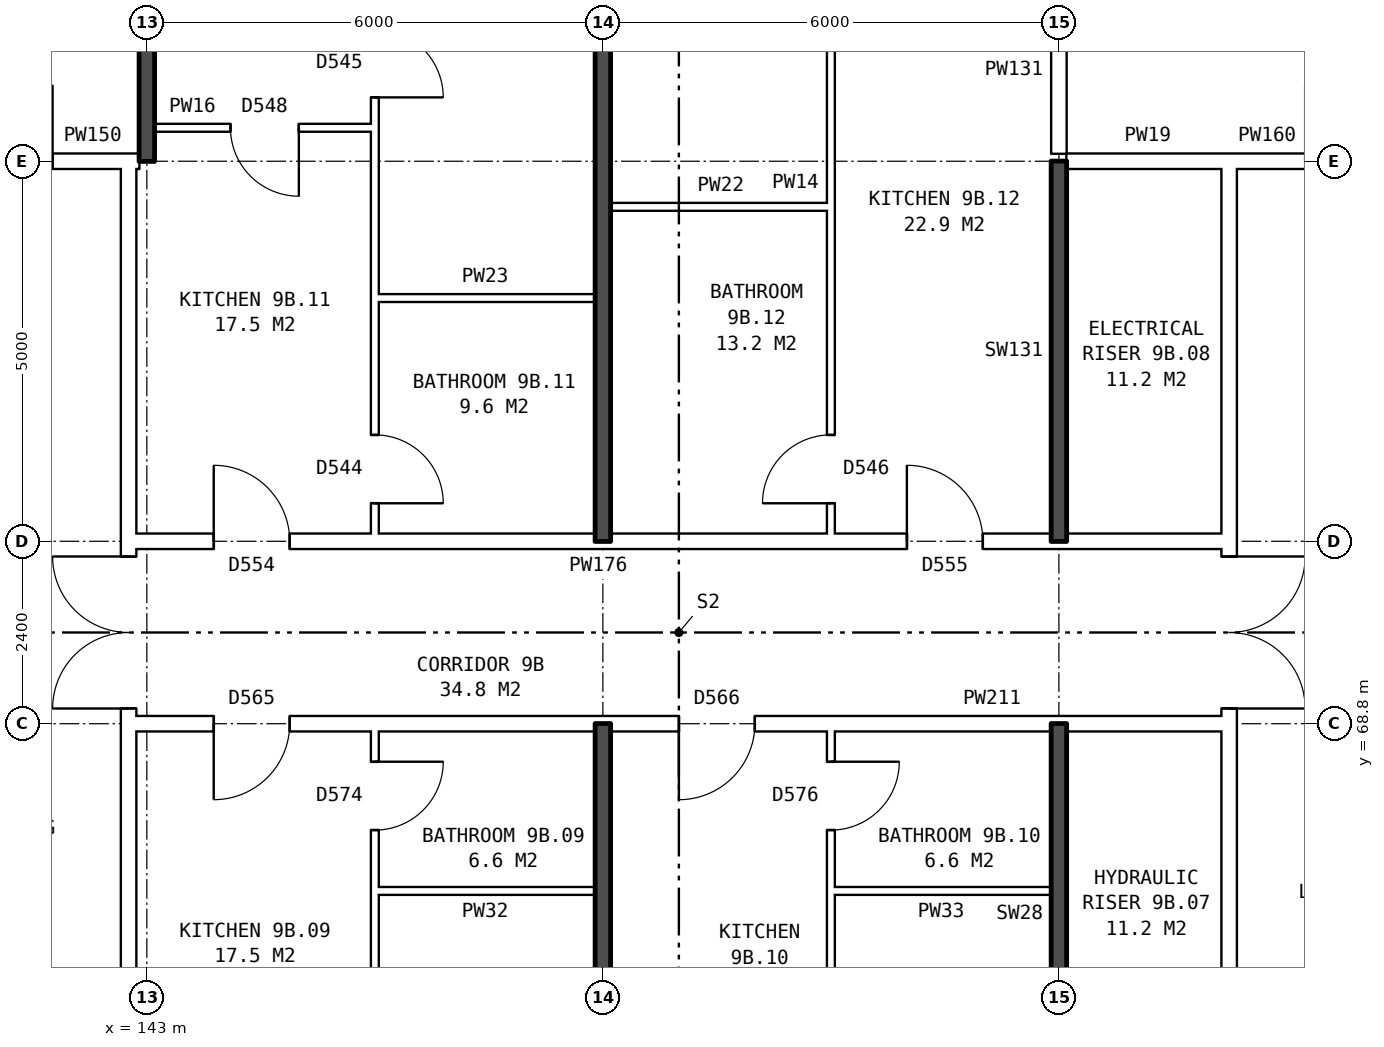
"""IFC4 building model, lengths in metres.
Left out: names, types, materials, properties, quantities, classifications, styles, units other than length and angle.
Written with IfcOpenShell. Run it as: python <this file> out.ifc"""

import sys

from ifc_helpers import new_model, si_unit, direction, frame, frame_2d, origin, place, context, subcontext, project, spatial, rectangle, extrude, element, fill, save


model = new_model("IFC4")
c1 = context("Model", 3, precision=1e-05, world=origin(), true_north=direction((0.0, 1.0)))
c2 = subcontext(c1, "Body", "Model", "MODEL_VIEW")
j1 = project(units=[si_unit("LENGTHUNIT", "METRE"), si_unit("PLANEANGLEUNIT", "RADIAN")], contexts=[c1])
p1 = place(None, origin())
s1 = spatial("IfcSite", under=j1, at=p1, CompositionType="ELEMENT")
p2 = place(p1, origin())
s2 = spatial("IfcBuilding", under=s1, at=p2, CompositionType="ELEMENT")
p3 = place(p2, frame((0.0, 0.0, 35.0)))
s3 = spatial("IfcBuildingStorey", under=s2, at=p3, CompositionType="ELEMENT", Elevation=35.0)
p4 = place(p3, frame((142.76, 63.9, 0.0), z_axis=(0.0, 0.0, 1.0), x_axis=(0.0, 1.0, 0.0)))
e1 = element("IfcWall", 1, at=p4, inside=s3, PredefinedType="PARTITIONING", context=c2, shape_type="SweptSolid", body=[
    extrude(rectangle(XDim=12.2, YDim=0.2, at=frame_2d((6.1, 0.0))), origin(), (0.0, 0.0, 1.0), 2.85),
])
p5 = place(p4, frame((5.1, 0.0, 0.0)))
e2 = element("IfcOpeningElement", 2, at=p5, cuts=e1, PredefinedType="OPENING", context=c2, shape_type="SweptSolid", body=[
    extrude(rectangle(XDim=2.0, YDim=2.1, at=frame_2d((1.0, 1.05))), frame((0.0, 0.11, 0.0), z_axis=(0.0, -1.0, 0.0), x_axis=(1.0, 0.0, 0.0)), (0.0, 0.0, 1.0), 0.22),
])
p6 = place(p3, frame((157.24, 63.9, 0.0), z_axis=(0.0, 0.0, 1.0), x_axis=(0.0, 1.0, 0.0)))
e3 = element("IfcWall", 3, at=p6, inside=s3, PredefinedType="PARTITIONING", context=c2, shape_type="SweptSolid", body=[
    extrude(rectangle(XDim=12.2, YDim=0.2, at=frame_2d((6.1, 0.0))), origin(), (0.0, 0.0, 1.0), 2.85),
])
p7 = place(p6, frame((5.1, 0.0, 0.0)))
e4 = element("IfcOpeningElement", 4, at=p7, cuts=e3, PredefinedType="OPENING", context=c2, shape_type="SweptSolid", body=[
    extrude(rectangle(XDim=2.0, YDim=2.1, at=frame_2d((1.0, 1.05))), frame((0.0, 0.11, 0.0), z_axis=(0.0, -1.0, 0.0), x_axis=(1.0, 0.0, 0.0)), (0.0, 0.0, 1.0), 0.22),
])
for number, where, z_axis, x_axis in (
    (5, (146.0, 66.6, 0.0), (0.0, 0.0, 1.0), (1.0, 0.0, 0.0)),
    (6, (152.0, 66.6, 0.0), (0.0, 0.0, 1.0), (1.0, 0.0, 0.0)),
):
    element("IfcWall", number, at=place(p3, frame(where, z_axis=z_axis, x_axis=x_axis)), inside=s3, PredefinedType="PARTITIONING", context=c2, shape_type="SweptSolid", body=[
        extrude(rectangle(XDim=2.9, YDim=0.1, at=frame_2d((1.45, 0.0))), origin(), (0.0, 0.0, 1.0), 2.85),
    ])
p8 = place(p3, frame((142.76, 68.8, 0.0), z_axis=(0.0, 0.0, 1.0), x_axis=(1.0, 0.0, 0.0)))
e7 = element("IfcWall", 7, at=p8, inside=s3, PredefinedType="PARTITIONING", context=c2, shape_type="SweptSolid", body=[
    extrude(rectangle(XDim=14.48, YDim=0.2, at=frame_2d((7.24, 0.0))), origin(), (0.0, 0.0, 1.0), 2.85),
])
p9 = place(p8, frame((1.12, 0.0, 0.0)))
e8 = element("IfcOpeningElement", 8, at=p9, cuts=e7, PredefinedType="OPENING", context=c2, shape_type="SweptSolid", body=[
    extrude(rectangle(XDim=1.0, YDim=2.1, at=frame_2d((0.5, 1.05))), frame((0.0, 0.11, 0.0), z_axis=(0.0, -1.0, 0.0), x_axis=(1.0, 0.0, 0.0)), (0.0, 0.0, 1.0), 0.22),
])
p10 = place(p8, frame((7.24, 0.0, 0.0)))
e9 = element("IfcOpeningElement", 9, at=p10, cuts=e7, PredefinedType="OPENING", context=c2, shape_type="SweptSolid", body=[
    extrude(rectangle(XDim=1.0, YDim=2.1, at=frame_2d((0.5, 1.05))), frame((0.0, 0.11, 0.0), z_axis=(0.0, -1.0, 0.0), x_axis=(1.0, 0.0, 0.0)), (0.0, 0.0, 1.0), 0.22),
])
p11 = place(p3, frame((142.76, 71.2, 0.0), z_axis=(0.0, 0.0, 1.0), x_axis=(1.0, 0.0, 0.0)))
e10 = element("IfcWall", 10, at=p11, inside=s3, PredefinedType="PARTITIONING", context=c2, shape_type="SweptSolid", body=[
    extrude(rectangle(XDim=14.48, YDim=0.2, at=frame_2d((7.24, 0.0))), origin(), (0.0, 0.0, 1.0), 2.85),
])
p12 = place(p11, frame((1.12, 0.0, 0.0)))
e11 = element("IfcOpeningElement", 11, at=p12, cuts=e10, PredefinedType="OPENING", context=c2, shape_type="SweptSolid", body=[
    extrude(rectangle(XDim=1.0, YDim=2.1, at=frame_2d((0.5, 1.05))), frame((0.0, 0.11, 0.0), z_axis=(0.0, -1.0, 0.0), x_axis=(1.0, 0.0, 0.0)), (0.0, 0.0, 1.0), 0.22),
])
p13 = place(p11, frame((10.24, 0.0, 0.0)))
e12 = element("IfcOpeningElement", 12, at=p13, cuts=e10, PredefinedType="OPENING", context=c2, shape_type="SweptSolid", body=[
    extrude(rectangle(XDim=1.0, YDim=2.1, at=frame_2d((0.5, 1.05))), frame((0.0, 0.11, 0.0), z_axis=(0.0, -1.0, 0.0), x_axis=(1.0, 0.0, 0.0)), (0.0, 0.0, 1.0), 0.22),
])
for number, where, z_axis, x_axis in (
    (13, (146.0, 74.4, 0.0), (0.0, 0.0, 1.0), (1.0, 0.0, 0.0)),
    (14, (149.1, 75.6, 0.0), (0.0, 0.0, 1.0), (1.0, 0.0, 0.0)),
):
    element("IfcWall", number, at=place(p3, frame(where, z_axis=z_axis, x_axis=x_axis)), inside=s3, PredefinedType="PARTITIONING", context=c2, shape_type="SweptSolid", body=[
        extrude(rectangle(XDim=2.9, YDim=0.1, at=frame_2d((1.45, 0.0))), origin(), (0.0, 0.0, 1.0), 2.85),
    ])
p14 = place(p3, frame((139.76, 76.2, 0.0), z_axis=(0.0, 0.0, 1.0), x_axis=(1.0, 0.0, 0.0)))
e15 = element("IfcWall", 15, at=p14, inside=s3, PredefinedType="PARTITIONING", context=c2, shape_type="SweptSolid", body=[
    extrude(rectangle(XDim=3.0, YDim=0.2, at=frame_2d((1.5, 0.0))), origin(), (0.0, 0.0, 1.0), 2.85),
])
p15 = place(p14, frame((1.0, 0.0, 0.0)))
e16 = element("IfcOpeningElement", 16, at=p15, cuts=e15, PredefinedType="OPENING", context=c2, shape_type="SweptSolid", body=[
    extrude(rectangle(XDim=1.0, YDim=2.1, at=frame_2d((0.5, 1.05))), frame((0.0, 0.11, 0.0), z_axis=(0.0, -1.0, 0.0), x_axis=(1.0, 0.0, 0.0)), (0.0, 0.0, 1.0), 0.22),
])
p16 = place(p3, frame((142.76, 76.2, 0.0), z_axis=(0.0, 0.0, 1.0), x_axis=(1.0, 0.0, 0.0)))
e17 = element("IfcWall", 17, at=p16, inside=s3, PredefinedType="PARTITIONING", context=c2, shape_type="SweptSolid", body=[
    extrude(rectangle(XDim=0.14, YDim=0.2, at=frame_2d((0.07, 0.0))), origin(), (0.0, 0.0, 1.0), 2.85),
])
p17 = place(p3, frame((155.1, 76.2, 0.0), z_axis=(0.0, 0.0, 1.0), x_axis=(1.0, 0.0, 0.0)))
e18 = element("IfcWall", 18, at=p17, inside=s3, PredefinedType="PARTITIONING", context=c2, shape_type="SweptSolid", body=[
    extrude(rectangle(XDim=2.14, YDim=0.2, at=frame_2d((1.07, 0.0))), origin(), (0.0, 0.0, 1.0), 2.85),
])
p18 = place(p3, frame((157.24, 76.2, 0.0), z_axis=(0.0, 0.0, 1.0), x_axis=(1.0, 0.0, 0.0)))
e19 = element("IfcWall", 19, at=p18, inside=s3, PredefinedType="PARTITIONING", context=c2, shape_type="SweptSolid", body=[
    extrude(rectangle(XDim=3.0, YDim=0.2, at=frame_2d((1.5, 0.0))), origin(), (0.0, 0.0, 1.0), 2.85),
])
p19 = place(p18, frame((1.0, 0.0, 0.0)))
e20 = element("IfcOpeningElement", 20, at=p19, cuts=e19, PredefinedType="OPENING", context=c2, shape_type="SweptSolid", body=[
    extrude(rectangle(XDim=1.0, YDim=2.1, at=frame_2d((0.5, 1.05))), frame((0.0, 0.11, 0.0), z_axis=(0.0, -1.0, 0.0), x_axis=(1.0, 0.0, 0.0)), (0.0, 0.0, 1.0), 0.22),
])
p20 = place(p3, frame((143.1, 76.64, 0.0), z_axis=(0.0, 0.0, 1.0), x_axis=(1.0, 0.0, 0.0)))
e21 = element("IfcWall", 21, at=p20, inside=s3, PredefinedType="PARTITIONING", context=c2, shape_type="SweptSolid", body=[
    extrude(rectangle(XDim=2.9, YDim=0.1, at=frame_2d((1.45, 0.0))), origin(), (0.0, 0.0, 1.0), 2.85),
])
p21 = place(p20, frame((1.0, 0.0, 0.0)))
e22 = element("IfcOpeningElement", 22, at=p21, cuts=e21, PredefinedType="OPENING", context=c2, shape_type="SweptSolid", body=[
    extrude(rectangle(XDim=0.9, YDim=2.1, at=frame_2d((0.45, 1.05))), frame((0.0, 0.06, 0.0), z_axis=(0.0, -1.0, 0.0), x_axis=(1.0, 0.0, 0.0)), (0.0, 0.0, 1.0), 0.12),
])
p22 = place(p3, frame((143.0, 76.2, 0.0), z_axis=(0.0, 0.0, 1.0), x_axis=(0.0, 1.0, 0.0)))
e23 = element("IfcWall", 23, at=p22, inside=s3, PredefinedType="SOLIDWALL", context=c2, shape_type="SweptSolid", body=[
    extrude(rectangle(XDim=9.44, YDim=0.2, at=frame_2d((4.72, 0.0))), origin(), (0.0, 0.0, 1.0), 2.85),
])
p23 = place(p3, frame((146.0, 54.36, 0.0), z_axis=(0.0, 0.0, 1.0), x_axis=(0.0, 1.0, 0.0)))
e24 = element("IfcWall", 24, at=p23, inside=s3, PredefinedType="PARTITIONING", context=c2, shape_type="SweptSolid", body=[
    extrude(rectangle(XDim=14.34, YDim=0.1, at=frame_2d((7.17, 0.0))), origin(), (0.0, 0.0, 1.0), 2.85),
])
p24 = place(p23, frame((7.7, 0.0, 0.0)))
e25 = element("IfcOpeningElement", 25, at=p24, cuts=e24, PredefinedType="OPENING", context=c2, shape_type="SweptSolid", body=[
    extrude(rectangle(XDim=0.9, YDim=2.1, at=frame_2d((0.45, 1.05))), frame((0.0, 0.06, 0.0), z_axis=(0.0, -1.0, 0.0), x_axis=(1.0, 0.0, 0.0)), (0.0, 0.0, 1.0), 0.12),
])
p25 = place(p23, frame((13.04, 0.0, 0.0)))
e26 = element("IfcOpeningElement", 26, at=p25, cuts=e24, PredefinedType="OPENING", context=c2, shape_type="SweptSolid", body=[
    extrude(rectangle(XDim=0.9, YDim=2.1, at=frame_2d((0.45, 1.05))), frame((0.0, 0.06, 0.0), z_axis=(0.0, -1.0, 0.0), x_axis=(1.0, 0.0, 0.0)), (0.0, 0.0, 1.0), 0.12),
])
p26 = place(p3, frame((146.0, 71.3, 0.0), z_axis=(0.0, 0.0, 1.0), x_axis=(0.0, 1.0, 0.0)))
e27 = element("IfcWall", 27, at=p26, inside=s3, PredefinedType="PARTITIONING", context=c2, shape_type="SweptSolid", body=[
    extrude(rectangle(XDim=14.34, YDim=0.1, at=frame_2d((7.17, 0.0))), origin(), (0.0, 0.0, 1.0), 2.85),
])
p27 = place(p26, frame((5.74, 0.0, 0.0)))
e28 = element("IfcOpeningElement", 28, at=p27, cuts=e27, PredefinedType="OPENING", context=c2, shape_type="SweptSolid", body=[
    extrude(rectangle(XDim=0.9, YDim=2.1, at=frame_2d((0.45, 1.05))), frame((0.0, 0.06, 0.0), z_axis=(0.0, -1.0, 0.0), x_axis=(1.0, 0.0, 0.0)), (0.0, 0.0, 1.0), 0.12),
])
p28 = place(p26, frame((0.4, 0.0, 0.0)))
e29 = element("IfcOpeningElement", 29, at=p28, cuts=e27, PredefinedType="OPENING", context=c2, shape_type="SweptSolid", body=[
    extrude(rectangle(XDim=0.9, YDim=2.1, at=frame_2d((0.45, 1.05))), frame((0.0, 0.06, 0.0), z_axis=(0.0, -1.0, 0.0), x_axis=(1.0, 0.0, 0.0)), (0.0, 0.0, 1.0), 0.12),
])
for number, where, z_axis, x_axis in (
    (30, (149.0, 54.36, 0.0), (0.0, 0.0, 1.0), (0.0, 1.0, 0.0)),
    (31, (149.0, 71.2, 0.0), (0.0, 0.0, 1.0), (0.0, 1.0, 0.0)),
):
    element("IfcWall", number, at=place(p3, frame(where, z_axis=z_axis, x_axis=x_axis)), inside=s3, PredefinedType="SOLIDWALL", context=c2, shape_type="SweptSolid", body=[
        extrude(rectangle(XDim=14.44, YDim=0.2, at=frame_2d((7.22, 0.0))), origin(), (0.0, 0.0, 1.0), 2.85),
    ])
p29 = place(p3, frame((152.0, 54.36, 0.0), z_axis=(0.0, 0.0, 1.0), x_axis=(0.0, 1.0, 0.0)))
e32 = element("IfcWall", 32, at=p29, inside=s3, PredefinedType="PARTITIONING", context=c2, shape_type="SweptSolid", body=[
    extrude(rectangle(XDim=14.34, YDim=0.1, at=frame_2d((7.17, 0.0))), origin(), (0.0, 0.0, 1.0), 2.85),
])
p30 = place(p29, frame((6.7, 0.0, 0.0)))
e33 = element("IfcOpeningElement", 33, at=p30, cuts=e32, PredefinedType="OPENING", context=c2, shape_type="SweptSolid", body=[
    extrude(rectangle(XDim=0.9, YDim=2.1, at=frame_2d((0.45, 1.05))), frame((0.0, 0.06, 0.0), z_axis=(0.0, -1.0, 0.0), x_axis=(1.0, 0.0, 0.0)), (0.0, 0.0, 1.0), 0.12),
])
p31 = place(p29, frame((13.04, 0.0, 0.0)))
e34 = element("IfcOpeningElement", 34, at=p31, cuts=e32, PredefinedType="OPENING", context=c2, shape_type="SweptSolid", body=[
    extrude(rectangle(XDim=0.9, YDim=2.1, at=frame_2d((0.45, 1.05))), frame((0.0, 0.06, 0.0), z_axis=(0.0, -1.0, 0.0), x_axis=(1.0, 0.0, 0.0)), (0.0, 0.0, 1.0), 0.12),
])
p32 = place(p3, frame((152.0, 71.3, 0.0), z_axis=(0.0, 0.0, 1.0), x_axis=(0.0, 1.0, 0.0)))
e35 = element("IfcWall", 35, at=p32, inside=s3, PredefinedType="PARTITIONING", context=c2, shape_type="SweptSolid", body=[
    extrude(rectangle(XDim=14.34, YDim=0.1, at=frame_2d((7.17, 0.0))), origin(), (0.0, 0.0, 1.0), 2.85),
])
p33 = place(p32, frame((7.94, 0.0, 0.0)))
e36 = element("IfcOpeningElement", 36, at=p33, cuts=e35, PredefinedType="OPENING", context=c2, shape_type="SweptSolid", body=[
    extrude(rectangle(XDim=0.9, YDim=2.1, at=frame_2d((0.45, 1.05))), frame((0.0, 0.06, 0.0), z_axis=(0.0, -1.0, 0.0), x_axis=(1.0, 0.0, 0.0)), (0.0, 0.0, 1.0), 0.12),
])
p34 = place(p32, frame((0.4, 0.0, 0.0)))
e37 = element("IfcOpeningElement", 37, at=p34, cuts=e35, PredefinedType="OPENING", context=c2, shape_type="SweptSolid", body=[
    extrude(rectangle(XDim=0.9, YDim=2.1, at=frame_2d((0.45, 1.05))), frame((0.0, 0.06, 0.0), z_axis=(0.0, -1.0, 0.0), x_axis=(1.0, 0.0, 0.0)), (0.0, 0.0, 1.0), 0.12),
])
for number, where, z_axis, x_axis in (
    (38, (155.0, 63.8, 0.0), (0.0, 0.0, 1.0), (0.0, 1.0, 0.0)),
    (39, (155.0, 71.2, 0.0), (0.0, 0.0, 1.0), (0.0, 1.0, 0.0)),
):
    element("IfcWall", number, at=place(p3, frame(where, z_axis=z_axis, x_axis=x_axis)), inside=s3, PredefinedType="SOLIDWALL", context=c2, shape_type="SweptSolid", body=[
        extrude(rectangle(XDim=5.0, YDim=0.2, at=frame_2d((2.5, 0.0))), origin(), (0.0, 0.0, 1.0), 2.85),
    ])
p35 = place(p3, frame((155.0, 76.3, 0.0), z_axis=(0.0, 0.0, 1.0), x_axis=(0.0, 1.0, 0.0)))
e40 = element("IfcWall", 40, at=p35, inside=s3, PredefinedType="PARTITIONING", context=c2, shape_type="SweptSolid", body=[
    extrude(rectangle(XDim=2.2, YDim=0.2, at=frame_2d((1.1, 0.0))), origin(), (0.0, 0.0, 1.0), 2.85),
])
p36 = place(p5, origin())
e41 = element("IfcDoor", 41, at=p36, inside=s3, OperationType="DOUBLE_DOOR_SINGLE_SWING", PredefinedType="DOOR", context=c2, shape_type="SweptSolid", body=[
    extrude(rectangle(XDim=2.0, YDim=2.1, at=frame_2d((1.0, 1.05))), frame((0.0, 0.025, 0.0), z_axis=(0.0, -1.0, 0.0), x_axis=(1.0, 0.0, 0.0)), (0.0, 0.0, 1.0), 0.05),
])
fill(e2, e41)
p37 = place(p7, frame((2.0, 0.0, 0.0), z_axis=(0.0, 0.0, 1.0), x_axis=(-1.0, 0.0, 0.0)))
e42 = element("IfcDoor", 42, at=p37, inside=s3, OperationType="DOUBLE_DOOR_SINGLE_SWING", PredefinedType="DOOR", context=c2, shape_type="SweptSolid", body=[
    extrude(rectangle(XDim=2.0, YDim=2.1, at=frame_2d((1.0, 1.05))), frame((0.0, 0.025, 0.0), z_axis=(0.0, -1.0, 0.0), x_axis=(1.0, 0.0, 0.0)), (0.0, 0.0, 1.0), 0.05),
])
fill(e4, e42)
p38 = place(p9, frame((1.0, 0.0, 0.0), z_axis=(0.0, 0.0, 1.0), x_axis=(-1.0, 0.0, 0.0)))
e43 = element("IfcDoor", 43, at=p38, inside=s3, OperationType="SINGLE_SWING_RIGHT", PredefinedType="DOOR", context=c2, shape_type="SweptSolid", body=[
    extrude(rectangle(XDim=1.0, YDim=2.1, at=frame_2d((0.5, 1.05))), frame((0.0, 0.025, 0.0), z_axis=(0.0, -1.0, 0.0), x_axis=(1.0, 0.0, 0.0)), (0.0, 0.0, 1.0), 0.05),
])
fill(e8, e43)
p39 = place(p25, frame((0.9, 0.0, 0.0), z_axis=(0.0, 0.0, 1.0), x_axis=(-1.0, 0.0, 0.0)))
e44 = element("IfcDoor", 44, at=p39, inside=s3, OperationType="SINGLE_SWING_LEFT", PredefinedType="DOOR", context=c2, shape_type="SweptSolid", body=[
    extrude(rectangle(XDim=0.9, YDim=2.1, at=frame_2d((0.45, 1.05))), frame((0.0, 0.025, 0.0), z_axis=(0.0, -1.0, 0.0), x_axis=(1.0, 0.0, 0.0)), (0.0, 0.0, 1.0), 0.05),
])
fill(e26, e44)
p40 = place(p10, frame((1.0, 0.0, 0.0), z_axis=(0.0, 0.0, 1.0), x_axis=(-1.0, 0.0, 0.0)))
e45 = element("IfcDoor", 45, at=p40, inside=s3, OperationType="SINGLE_SWING_RIGHT", PredefinedType="DOOR", context=c2, shape_type="SweptSolid", body=[
    extrude(rectangle(XDim=1.0, YDim=2.1, at=frame_2d((0.5, 1.05))), frame((0.0, 0.025, 0.0), z_axis=(0.0, -1.0, 0.0), x_axis=(1.0, 0.0, 0.0)), (0.0, 0.0, 1.0), 0.05),
])
fill(e9, e45)
p41 = place(p31, frame((0.9, 0.0, 0.0), z_axis=(0.0, 0.0, 1.0), x_axis=(-1.0, 0.0, 0.0)))
e46 = element("IfcDoor", 46, at=p41, inside=s3, OperationType="SINGLE_SWING_LEFT", PredefinedType="DOOR", context=c2, shape_type="SweptSolid", body=[
    extrude(rectangle(XDim=0.9, YDim=2.1, at=frame_2d((0.45, 1.05))), frame((0.0, 0.025, 0.0), z_axis=(0.0, -1.0, 0.0), x_axis=(1.0, 0.0, 0.0)), (0.0, 0.0, 1.0), 0.05),
])
fill(e34, e46)
p42 = place(p27, frame((0.9, 0.0, 0.0), z_axis=(0.0, 0.0, 1.0), x_axis=(-1.0, 0.0, 0.0)))
e47 = element("IfcDoor", 47, at=p42, inside=s3, OperationType="SINGLE_SWING_RIGHT", PredefinedType="DOOR", context=c2, shape_type="SweptSolid", body=[
    extrude(rectangle(XDim=0.9, YDim=2.1, at=frame_2d((0.45, 1.05))), frame((0.0, 0.025, 0.0), z_axis=(0.0, -1.0, 0.0), x_axis=(1.0, 0.0, 0.0)), (0.0, 0.0, 1.0), 0.05),
])
fill(e28, e47)
p43 = place(p12, origin())
e48 = element("IfcDoor", 48, at=p43, inside=s3, OperationType="SINGLE_SWING_LEFT", PredefinedType="DOOR", context=c2, shape_type="SweptSolid", body=[
    extrude(rectangle(XDim=1.0, YDim=2.1, at=frame_2d((0.5, 1.05))), frame((0.0, 0.025, 0.0), z_axis=(0.0, -1.0, 0.0), x_axis=(1.0, 0.0, 0.0)), (0.0, 0.0, 1.0), 0.05),
])
fill(e11, e48)
p44 = place(p21, frame((0.9, 0.0, 0.0), z_axis=(0.0, 0.0, 1.0), x_axis=(-1.0, 0.0, 0.0)))
e49 = element("IfcDoor", 49, at=p44, inside=s3, OperationType="SINGLE_SWING_LEFT", PredefinedType="DOOR", context=c2, shape_type="SweptSolid", body=[
    extrude(rectangle(XDim=0.9, YDim=2.1, at=frame_2d((0.45, 1.05))), frame((0.0, 0.025, 0.0), z_axis=(0.0, -1.0, 0.0), x_axis=(1.0, 0.0, 0.0)), (0.0, 0.0, 1.0), 0.05),
])
fill(e22, e49)
p45 = place(p28, frame((0.9, 0.0, 0.0), z_axis=(0.0, 0.0, 1.0), x_axis=(-1.0, 0.0, 0.0)))
e50 = element("IfcDoor", 50, at=p45, inside=s3, OperationType="SINGLE_SWING_RIGHT", PredefinedType="DOOR", context=c2, shape_type="SweptSolid", body=[
    extrude(rectangle(XDim=0.9, YDim=2.1, at=frame_2d((0.45, 1.05))), frame((0.0, 0.025, 0.0), z_axis=(0.0, -1.0, 0.0), x_axis=(1.0, 0.0, 0.0)), (0.0, 0.0, 1.0), 0.05),
])
fill(e29, e50)
p46 = place(p13, origin())
e51 = element("IfcDoor", 51, at=p46, inside=s3, OperationType="SINGLE_SWING_LEFT", PredefinedType="DOOR", context=c2, shape_type="SweptSolid", body=[
    extrude(rectangle(XDim=1.0, YDim=2.1, at=frame_2d((0.5, 1.05))), frame((0.0, 0.025, 0.0), z_axis=(0.0, -1.0, 0.0), x_axis=(1.0, 0.0, 0.0)), (0.0, 0.0, 1.0), 0.05),
])
fill(e12, e51)
p47 = place(p34, origin())
e52 = element("IfcDoor", 52, at=p47, inside=s3, OperationType="SINGLE_SWING_LEFT", PredefinedType="DOOR", context=c2, shape_type="SweptSolid", body=[
    extrude(rectangle(XDim=0.9, YDim=2.1, at=frame_2d((0.45, 1.05))), frame((0.0, 0.025, 0.0), z_axis=(0.0, -1.0, 0.0), x_axis=(1.0, 0.0, 0.0)), (0.0, 0.0, 1.0), 0.05),
])
fill(e37, e52)
save(model, sys.argv[1])
